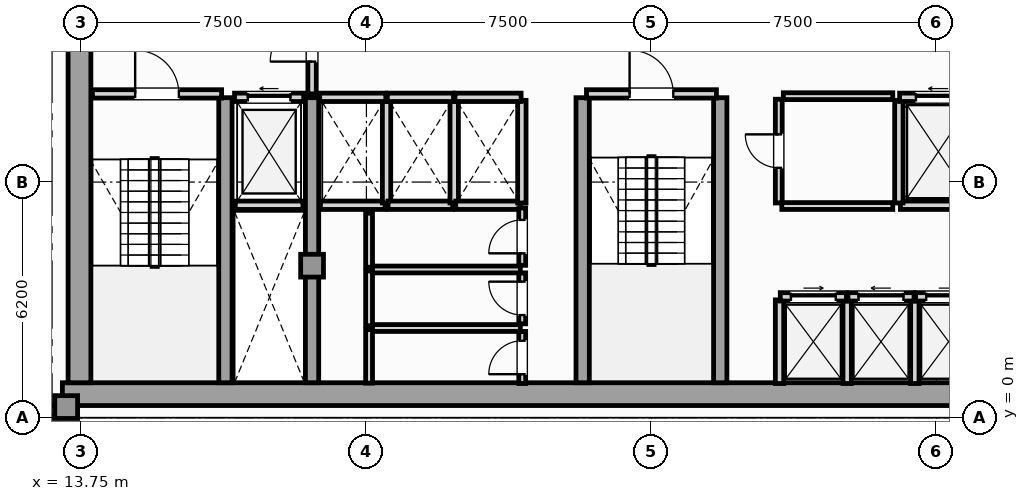
"""IFC4 building model, lengths in metres.
Left out: names, types, materials, properties, quantities, classifications, styles, units other than length and angle.
Written with IfcOpenShell. Run it as: python <this file> out.ifc"""

import sys

from ifc_helpers import new_model, si_unit, direction, frame, frame_2d, origin, origin_2d, place, context, subcontext, project, spatial, rectangle, extrude, element, fill, save


model = new_model("IFC4")
c1 = context("Model", 3, precision=1e-05, world=origin(), true_north=direction((0.0, 1.0)))
c2 = subcontext(c1, "Body", "Model", "MODEL_VIEW")
j1 = project(units=[si_unit("LENGTHUNIT", "METRE"), si_unit("PLANEANGLEUNIT", "RADIAN")], contexts=[c1])
p1 = place(None, origin())
s1 = spatial("IfcSite", under=j1, at=p1, CompositionType="ELEMENT")
p2 = place(p1, origin())
s2 = spatial("IfcBuilding", under=s1, at=p2, CompositionType="ELEMENT")
p3 = place(p2, frame((0.0, 0.0, 204.15)))
s3 = spatial("IfcBuildingStorey", under=s2, at=p3, CompositionType="ELEMENT", Elevation=204.15)
p4 = place(p3, frame((13.25, 0.62, 0.0), z_axis=(0.0, 0.0, 1.0), x_axis=(1.0, 0.0, 0.0)))
e1 = element("IfcWall", 1, at=p4, inside=s3, PredefinedType="SHEAR", context=c2, shape_type="SweptSolid", body=[
    extrude(rectangle(XDim=31.0, YDim=0.6, at=frame_2d((15.5, 0.0))), origin(), (0.0, 0.0, 1.0), 3.63),
])
p5 = place(p3, frame((13.7, 0.92, 0.0), z_axis=(0.0, 0.0, 1.0), x_axis=(0.0, 1.0, 0.0)))
e2 = element("IfcWall", 2, at=p5, inside=s3, PredefinedType="SHEAR", context=c2, shape_type="SweptSolid", body=[
    extrude(rectangle(XDim=10.53, YDim=0.6, at=frame_2d((5.265, 0.0))), origin(), (0.0, 0.0, 1.0), 3.63),
])
for number, where, z_axis, x_axis in (
    (3, (17.54, 0.92, 0.0), (0.0, 0.0, 1.0), (0.0, 1.0, 0.0)),
    (4, (19.82, 0.92, 0.0), (0.0, 0.0, 1.0), (0.0, 1.0, 0.0)),
    (5, (26.94, 0.92, 0.0), (0.0, 0.0, 1.0), (0.0, 1.0, 0.0)),
    (6, (30.56, 0.92, 0.0), (0.0, 0.0, 1.0), (0.0, 1.0, 0.0)),
):
    element("IfcWall", number, at=place(p3, frame(where, z_axis=z_axis, x_axis=x_axis)), inside=s3, PredefinedType="SHEAR", context=c2, shape_type="SweptSolid", body=[
        extrude(rectangle(XDim=7.5, YDim=0.35, at=frame_2d((3.75, 0.0))), origin(), (0.0, 0.0, 1.0), 3.63),
    ])
for number, where, z_axis, x_axis in (
    (7, (13.35, 0.28, 0.0), (0.0, 0.0, 1.0), (1.0, 0.0, 0.0)),
    (8, (19.82, 4.0, 0.0), (0.0, 0.0, 1.0), (1.0, 0.0, 0.0)),
):
    element("IfcColumn", number, at=place(p3, frame(where, z_axis=z_axis, x_axis=x_axis)), inside=s3, PredefinedType="COLUMN", context=c2, shape_type="SweptSolid", body=[
        extrude(rectangle(XDim=0.6, YDim=0.6, at=origin_2d()), origin(), (0.0, 0.0, 1.0), 3.85),
    ])
p6 = place(p3, frame((8.44, 0.18, 0.0), z_axis=(0.0, 0.0, 1.0), x_axis=(1.0, 0.0, 0.0)))
e9 = element("IfcWall", 9, at=p6, inside=s3, PredefinedType="SOLIDWALL", context=c2, shape_type="SweptSolid", body=[
    extrude(rectangle(XDim=4.81, YDim=0.3, at=frame_2d((2.405, 0.0))), origin(), (0.0, 0.0, 1.0), 3.63),
])
p7 = place(p6, frame((1.205, 0.0, 0.85)))
e10 = element("IfcOpeningElement", 10, at=p7, cuts=e9, PredefinedType="OPENING", context=c2, shape_type="SweptSolid", body=[
    extrude(rectangle(XDim=2.4, YDim=2.0, at=frame_2d((1.2, 1.0))), frame((0.0, 0.16, 0.0), z_axis=(0.0, -1.0, 0.0), x_axis=(1.0, 0.0, 0.0)), (0.0, 0.0, 1.0), 0.32),
])
p8 = place(p3, frame((17.8, 5.59, 0.0), z_axis=(0.0, 0.0, 1.0), x_axis=(1.0, 0.0, 0.0)))
e11 = element("IfcWall", 11, at=p8, inside=s3, PredefinedType="SOLIDWALL", context=c2, shape_type="SweptSolid", body=[
    extrude(rectangle(XDim=1.78, YDim=0.22, at=frame_2d((0.89, 0.0))), origin(), (0.0, 0.0, 1.0), 3.63),
])
p9 = place(p3, frame((17.78, 8.43, 0.0), z_axis=(0.0, 0.0, 1.0), x_axis=(1.0, 0.0, 0.0)))
e12 = element("IfcWall", 12, at=p9, inside=s3, PredefinedType="SOLIDWALL", context=c2, shape_type="SweptSolid", body=[
    extrude(rectangle(XDim=1.82, YDim=0.22, at=frame_2d((0.91, 0.0))), origin(), (0.0, 0.0, 1.0), 3.63),
])
p10 = place(p9, frame((0.35, 0.0, 0.0)))
e13 = element("IfcOpeningElement", 13, at=p10, cuts=e12, PredefinedType="OPENING", context=c2, shape_type="SweptSolid", body=[
    extrude(rectangle(XDim=1.12, YDim=2.25, at=frame_2d((0.56, 1.125))), frame((0.0, 0.12, 0.0), z_axis=(0.0, -1.0, 0.0), x_axis=(1.0, 0.0, 0.0)), (0.0, 0.0, 1.0), 0.24),
])
p11 = place(p3, frame((35.3, 5.59, 0.0), z_axis=(0.0, 0.0, 1.0), x_axis=(1.0, 0.0, 0.0)))
e14 = element("IfcWall", 14, at=p11, inside=s3, PredefinedType="SOLIDWALL", context=c2, shape_type="SweptSolid", body=[
    extrude(rectangle(XDim=2.0, YDim=0.22, at=frame_2d((1.0, 0.0))), origin(), (0.0, 0.0, 1.0), 3.63),
])
p12 = place(p3, frame((35.26, 5.65, 0.0), z_axis=(0.0, 0.0, 1.0), x_axis=(0.0, 1.0, 0.0)))
e15 = element("IfcWall", 15, at=p12, inside=s3, PredefinedType="SOLIDWALL", context=c2, shape_type="SweptSolid", body=[
    extrude(rectangle(XDim=2.7, YDim=0.22, at=frame_2d((1.35, 0.0))), origin(), (0.0, 0.0, 1.0), 3.63),
])
p13 = place(p3, frame((35.28, 8.43, 0.0), z_axis=(0.0, 0.0, 1.0), x_axis=(1.0, 0.0, 0.0)))
e16 = element("IfcWall", 16, at=p13, inside=s3, PredefinedType="SOLIDWALL", context=c2, shape_type="SweptSolid", body=[
    extrude(rectangle(XDim=2.04, YDim=0.22, at=frame_2d((1.02, 0.0))), origin(), (0.0, 0.0, 1.0), 3.63),
])
p14 = place(p13, frame((0.43, 0.0, 0.0)))
e17 = element("IfcOpeningElement", 17, at=p14, cuts=e16, PredefinedType="OPENING", context=c2, shape_type="SweptSolid", body=[
    extrude(rectangle(XDim=1.18, YDim=2.2, at=frame_2d((0.59, 1.1))), frame((0.0, 0.12, 0.0), z_axis=(0.0, -1.0, 0.0), x_axis=(1.0, 0.0, 0.0)), (0.0, 0.0, 1.0), 0.24),
])
for number, where, z_axis, x_axis in (
    (18, (32.12, 0.9, 0.0), (0.0, 0.0, 1.0), (0.0, 1.0, 0.0)),
    (19, (33.9, 0.9, 0.0), (0.0, 0.0, 1.0), (0.0, 1.0, 0.0)),
):
    element("IfcWall", number, at=place(p3, frame(where, z_axis=z_axis, x_axis=x_axis)), inside=s3, PredefinedType="SOLIDWALL", context=c2, shape_type="SweptSolid", body=[
        extrude(rectangle(XDim=2.2, YDim=0.22, at=frame_2d((1.1, 0.0))), origin(), (0.0, 0.0, 1.0), 3.63),
    ])
p15 = place(p3, frame((32.14, 3.18, 0.0), z_axis=(0.0, 0.0, 1.0), x_axis=(1.0, 0.0, 0.0)))
e20 = element("IfcWall", 20, at=p15, inside=s3, PredefinedType="SOLIDWALL", context=c2, shape_type="SweptSolid", body=[
    extrude(rectangle(XDim=1.74, YDim=0.22, at=frame_2d((0.87, 0.0))), origin(), (0.0, 0.0, 1.0), 3.63),
])
p16 = place(p15, frame((0.28, 0.0, 0.0)))
e21 = element("IfcOpeningElement", 21, at=p16, cuts=e20, PredefinedType="OPENING", context=c2, shape_type="SweptSolid", body=[
    extrude(rectangle(XDim=1.18, YDim=2.2, at=frame_2d((0.59, 1.1))), frame((0.0, 0.12, 0.0), z_axis=(0.0, -1.0, 0.0), x_axis=(1.0, 0.0, 0.0)), (0.0, 0.0, 1.0), 0.24),
])
p17 = place(p3, frame((35.68, 0.9, 0.0), z_axis=(0.0, 0.0, 1.0), x_axis=(0.0, 1.0, 0.0)))
e22 = element("IfcWall", 22, at=p17, inside=s3, PredefinedType="SOLIDWALL", context=c2, shape_type="SweptSolid", body=[
    extrude(rectangle(XDim=2.2, YDim=0.22, at=frame_2d((1.1, 0.0))), origin(), (0.0, 0.0, 1.0), 3.63),
])
p18 = place(p3, frame((33.92, 3.18, 0.0), z_axis=(0.0, 0.0, 1.0), x_axis=(1.0, 0.0, 0.0)))
e23 = element("IfcWall", 23, at=p18, inside=s3, PredefinedType="SOLIDWALL", context=c2, shape_type="SweptSolid", body=[
    extrude(rectangle(XDim=1.74, YDim=0.22, at=frame_2d((0.87, 0.0))), origin(), (0.0, 0.0, 1.0), 3.63),
])
p19 = place(p18, frame((0.28, 0.0, 0.0)))
e24 = element("IfcOpeningElement", 24, at=p19, cuts=e23, PredefinedType="OPENING", context=c2, shape_type="SweptSolid", body=[
    extrude(rectangle(XDim=1.18, YDim=2.2, at=frame_2d((0.59, 1.1))), frame((0.0, 0.12, 0.0), z_axis=(0.0, -1.0, 0.0), x_axis=(1.0, 0.0, 0.0)), (0.0, 0.0, 1.0), 0.24),
])
p20 = place(p3, frame((35.7, 3.18, 0.0), z_axis=(0.0, 0.0, 1.0), x_axis=(1.0, 0.0, 0.0)))
e25 = element("IfcWall", 25, at=p20, inside=s3, PredefinedType="SOLIDWALL", context=c2, shape_type="SweptSolid", body=[
    extrude(rectangle(XDim=1.74, YDim=0.22, at=frame_2d((0.87, 0.0))), origin(), (0.0, 0.0, 1.0), 3.63),
])
p21 = place(p20, frame((0.28, 0.0, 0.0)))
e26 = element("IfcOpeningElement", 26, at=p21, cuts=e25, PredefinedType="OPENING", context=c2, shape_type="SweptSolid", body=[
    extrude(rectangle(XDim=1.18, YDim=2.2, at=frame_2d((0.59, 1.1))), frame((0.0, 0.12, 0.0), z_axis=(0.0, -1.0, 0.0), x_axis=(1.0, 0.0, 0.0)), (0.0, 0.0, 1.0), 0.24),
])
p22 = place(p3, frame((20.04, 5.59, 0.0), z_axis=(0.0, 0.0, 1.0), x_axis=(1.0, 0.0, 0.0)))
e27 = element("IfcWall", 27, at=p22, inside=s3, PredefinedType="SOLIDWALL", context=c2, shape_type="SweptSolid", body=[
    extrude(rectangle(XDim=1.7, YDim=0.22, at=frame_2d((0.85, 0.0))), origin(), (0.0, 0.0, 1.0), 3.63),
])
p23 = place(p3, frame((21.78, 5.65, 0.0), z_axis=(0.0, 0.0, 1.0), x_axis=(0.0, 1.0, 0.0)))
e28 = element("IfcWall", 28, at=p23, inside=s3, PredefinedType="SOLIDWALL", context=c2, shape_type="SweptSolid", body=[
    extrude(rectangle(XDim=2.7, YDim=0.22, at=frame_2d((1.35, 0.0))), origin(), (0.0, 0.0, 1.0), 3.63),
])
p24 = place(p3, frame((20.02, 8.43, 0.0), z_axis=(0.0, 0.0, 1.0), x_axis=(1.0, 0.0, 0.0)))
e29 = element("IfcWall", 29, at=p24, inside=s3, PredefinedType="SOLIDWALL", context=c2, shape_type="SweptSolid", body=[
    extrude(rectangle(XDim=1.74, YDim=0.22, at=frame_2d((0.87, 0.0))), origin(), (0.0, 0.0, 1.0), 3.63),
])
p25 = place(p3, frame((21.82, 5.59, 0.0), z_axis=(0.0, 0.0, 1.0), x_axis=(1.0, 0.0, 0.0)))
e30 = element("IfcWall", 30, at=p25, inside=s3, PredefinedType="SOLIDWALL", context=c2, shape_type="SweptSolid", body=[
    extrude(rectangle(XDim=1.7, YDim=0.22, at=frame_2d((0.85, 0.0))), origin(), (0.0, 0.0, 1.0), 3.63),
])
p26 = place(p3, frame((23.56, 5.65, 0.0), z_axis=(0.0, 0.0, 1.0), x_axis=(0.0, 1.0, 0.0)))
e31 = element("IfcWall", 31, at=p26, inside=s3, PredefinedType="SOLIDWALL", context=c2, shape_type="SweptSolid", body=[
    extrude(rectangle(XDim=2.7, YDim=0.22, at=frame_2d((1.35, 0.0))), origin(), (0.0, 0.0, 1.0), 3.63),
])
p27 = place(p3, frame((21.8, 8.43, 0.0), z_axis=(0.0, 0.0, 1.0), x_axis=(1.0, 0.0, 0.0)))
e32 = element("IfcWall", 32, at=p27, inside=s3, PredefinedType="SOLIDWALL", context=c2, shape_type="SweptSolid", body=[
    extrude(rectangle(XDim=1.74, YDim=0.22, at=frame_2d((0.87, 0.0))), origin(), (0.0, 0.0, 1.0), 3.63),
])
p28 = place(p3, frame((23.6, 5.59, 0.0), z_axis=(0.0, 0.0, 1.0), x_axis=(1.0, 0.0, 0.0)))
e33 = element("IfcWall", 33, at=p28, inside=s3, PredefinedType="SOLIDWALL", context=c2, shape_type="SweptSolid", body=[
    extrude(rectangle(XDim=1.7, YDim=0.22, at=frame_2d((0.85, 0.0))), origin(), (0.0, 0.0, 1.0), 3.63),
])
p29 = place(p3, frame((25.34, 5.65, 0.0), z_axis=(0.0, 0.0, 1.0), x_axis=(0.0, 1.0, 0.0)))
e34 = element("IfcWall", 34, at=p29, inside=s3, PredefinedType="SOLIDWALL", context=c2, shape_type="SweptSolid", body=[
    extrude(rectangle(XDim=2.7, YDim=0.22, at=frame_2d((1.35, 0.0))), origin(), (0.0, 0.0, 1.0), 3.63),
])
p30 = place(p3, frame((23.58, 8.43, 0.0), z_axis=(0.0, 0.0, 1.0), x_axis=(1.0, 0.0, 0.0)))
e35 = element("IfcWall", 35, at=p30, inside=s3, PredefinedType="SOLIDWALL", context=c2, shape_type="SweptSolid", body=[
    extrude(rectangle(XDim=1.74, YDim=0.22, at=frame_2d((0.87, 0.0))), origin(), (0.0, 0.0, 1.0), 3.63),
])
p31 = place(p3, frame((14.04, 8.52, 0.0), z_axis=(0.0, 0.0, 1.0), x_axis=(1.0, 0.0, 0.0)))
e36 = element("IfcWall", 36, at=p31, inside=s3, PredefinedType="SOLIDWALL", context=c2, shape_type="SweptSolid", body=[
    extrude(rectangle(XDim=3.4, YDim=0.22, at=frame_2d((1.7, 0.0))), origin(), (0.0, 0.0, 1.0), 3.63),
])
p32 = place(p31, frame((1.125, 0.0, 0.0)))
e37 = element("IfcOpeningElement", 37, at=p32, cuts=e36, PredefinedType="OPENING", context=c2, shape_type="SweptSolid", body=[
    extrude(rectangle(XDim=1.15, YDim=2.2, at=frame_2d((0.575, 1.1))), frame((0.0, 0.12, 0.0), z_axis=(0.0, -1.0, 0.0), x_axis=(1.0, 0.0, 0.0)), (0.0, 0.0, 1.0), 0.24),
])
p33 = place(p3, frame((27.04, 8.52, 0.0), z_axis=(0.0, 0.0, 1.0), x_axis=(1.0, 0.0, 0.0)))
e38 = element("IfcWall", 38, at=p33, inside=s3, PredefinedType="SOLIDWALL", context=c2, shape_type="SweptSolid", body=[
    extrude(rectangle(XDim=3.42, YDim=0.22, at=frame_2d((1.71, 0.0))), origin(), (0.0, 0.0, 1.0), 3.63),
])
p34 = place(p33, frame((1.135, 0.0, 0.0)))
e39 = element("IfcOpeningElement", 39, at=p34, cuts=e38, PredefinedType="OPENING", context=c2, shape_type="SweptSolid", body=[
    extrude(rectangle(XDim=1.15, YDim=2.2, at=frame_2d((0.575, 1.1))), frame((0.0, 0.12, 0.0), z_axis=(0.0, -1.0, 0.0), x_axis=(1.0, 0.0, 0.0)), (0.0, 0.0, 1.0), 0.24),
])
p35 = place(p3, frame((19.82, 8.52, 0.0), z_axis=(0.0, 0.0, 1.0), x_axis=(0.0, 1.0, 0.0)))
e40 = element("IfcWall", 40, at=p35, inside=s3, PredefinedType="SOLIDWALL", context=c2, shape_type="SweptSolid", body=[
    extrude(rectangle(XDim=2.8, YDim=0.22, at=frame_2d((1.4, 0.0))), origin(), (0.0, 0.0, 1.0), 3.086),
])
p36 = place(p35, frame((0.85, 0.0, 0.0)))
e41 = element("IfcOpeningElement", 41, at=p36, cuts=e40, PredefinedType="OPENING", context=c2, shape_type="SweptSolid", body=[
    extrude(rectangle(XDim=1.1, YDim=2.2, at=frame_2d((0.55, 1.1))), frame((0.0, 0.12, 0.0), z_axis=(0.0, -1.0, 0.0), x_axis=(1.0, 0.0, 0.0)), (0.0, 0.0, 1.0), 0.24),
])
p37 = place(p3, frame((25.35, 0.9, 0.0), z_axis=(0.0, 0.0, 1.0), x_axis=(0.0, 1.0, 0.0)))
e42 = element("IfcWall", 42, at=p37, inside=s3, PredefinedType="PARTITIONING", context=c2, shape_type="SweptSolid", body=[
    extrude(rectangle(XDim=1.37, YDim=0.18, at=frame_2d((0.685, 0.0))), origin(), (0.0, 0.0, 1.0), 3.63),
])
p38 = place(p37, frame((0.245, 0.0, 0.0)))
e43 = element("IfcOpeningElement", 43, at=p38, cuts=e42, PredefinedType="OPENING", context=c2, shape_type="SweptSolid", body=[
    extrude(rectangle(XDim=0.88, YDim=2.05, at=frame_2d((0.44, 1.025))), frame((0.0, 0.1, 0.0), z_axis=(0.0, -1.0, 0.0), x_axis=(1.0, 0.0, 0.0)), (0.0, 0.0, 1.0), 0.2),
])
p39 = place(p3, frame((21.36, 2.36, 0.0), z_axis=(0.0, 0.0, 1.0), x_axis=(1.0, 0.0, 0.0)))
e44 = element("IfcWall", 44, at=p39, inside=s3, PredefinedType="PARTITIONING", context=c2, shape_type="SweptSolid", body=[
    extrude(rectangle(XDim=3.94, YDim=0.18, at=frame_2d((1.97, 0.0))), origin(), (0.0, 0.0, 1.0), 3.63),
])
p40 = place(p3, frame((21.32, 0.91, 0.0), z_axis=(0.0, 0.0, 1.0), x_axis=(0.0, 1.0, 0.0)))
e45 = element("IfcWall", 45, at=p40, inside=s3, PredefinedType="PARTITIONING", context=c2, shape_type="SweptSolid", body=[
    extrude(rectangle(XDim=1.41, YDim=0.18, at=frame_2d((0.705, 0.0))), origin(), (0.0, 0.0, 1.0), 3.63),
])
p41 = place(p3, frame((25.35, 2.47, 0.0), z_axis=(0.0, 0.0, 1.0), x_axis=(0.0, 1.0, 0.0)))
e46 = element("IfcWall", 46, at=p41, inside=s3, PredefinedType="PARTITIONING", context=c2, shape_type="SweptSolid", body=[
    extrude(rectangle(XDim=1.34, YDim=0.18, at=frame_2d((0.67, 0.0))), origin(), (0.0, 0.0, 1.0), 3.63),
])
p42 = place(p41, frame((0.23, 0.0, 0.0)))
e47 = element("IfcOpeningElement", 47, at=p42, cuts=e46, PredefinedType="OPENING", context=c2, shape_type="SweptSolid", body=[
    extrude(rectangle(XDim=0.88, YDim=2.05, at=frame_2d((0.44, 1.025))), frame((0.0, 0.1, 0.0), z_axis=(0.0, -1.0, 0.0), x_axis=(1.0, 0.0, 0.0)), (0.0, 0.0, 1.0), 0.2),
])
p43 = place(p3, frame((21.36, 3.9, 0.0), z_axis=(0.0, 0.0, 1.0), x_axis=(1.0, 0.0, 0.0)))
e48 = element("IfcWall", 48, at=p43, inside=s3, PredefinedType="PARTITIONING", context=c2, shape_type="SweptSolid", body=[
    extrude(rectangle(XDim=3.94, YDim=0.18, at=frame_2d((1.97, 0.0))), origin(), (0.0, 0.0, 1.0), 3.63),
])
p44 = place(p3, frame((21.32, 2.42, 0.0), z_axis=(0.0, 0.0, 1.0), x_axis=(0.0, 1.0, 0.0)))
e49 = element("IfcWall", 49, at=p44, inside=s3, PredefinedType="PARTITIONING", context=c2, shape_type="SweptSolid", body=[
    extrude(rectangle(XDim=1.44, YDim=0.18, at=frame_2d((0.72, 0.0))), origin(), (0.0, 0.0, 1.0), 3.63),
])
p45 = place(p3, frame((25.35, 4.01, 0.0), z_axis=(0.0, 0.0, 1.0), x_axis=(0.0, 1.0, 0.0)))
e50 = element("IfcWall", 50, at=p45, inside=s3, PredefinedType="PARTITIONING", context=c2, shape_type="SweptSolid", body=[
    extrude(rectangle(XDim=1.51, YDim=0.18, at=frame_2d((0.755, 0.0))), origin(), (0.0, 0.0, 1.0), 3.63),
])
p46 = place(p45, frame((0.315, 0.0, 0.0)))
e51 = element("IfcOpeningElement", 51, at=p46, cuts=e50, PredefinedType="OPENING", context=c2, shape_type="SweptSolid", body=[
    extrude(rectangle(XDim=0.88, YDim=2.05, at=frame_2d((0.44, 1.025))), frame((0.0, 0.1, 0.0), z_axis=(0.0, -1.0, 0.0), x_axis=(1.0, 0.0, 0.0)), (0.0, 0.0, 1.0), 0.2),
])
p47 = place(p3, frame((21.32, 3.96, 0.0), z_axis=(0.0, 0.0, 1.0), x_axis=(0.0, 1.0, 0.0)))
e52 = element("IfcWall", 52, at=p47, inside=s3, PredefinedType="PARTITIONING", context=c2, shape_type="SweptSolid", body=[
    extrude(rectangle(XDim=1.42, YDim=0.18, at=frame_2d((0.71, 0.0))), origin(), (0.0, 0.0, 1.0), 3.63),
])
p48 = place(p3, frame((32.1, 5.65, 0.0), z_axis=(0.0, 0.0, 1.0), x_axis=(0.0, 1.0, 0.0)))
e53 = element("IfcWall", 53, at=p48, inside=s3, PredefinedType="PARTITIONING", context=c2, shape_type="SweptSolid", body=[
    extrude(rectangle(XDim=2.73, YDim=0.18, at=frame_2d((1.365, 0.0))), origin(), (0.0, 0.0, 1.0), 3.63),
])
p49 = place(p48, frame((0.925, 0.0, 0.0)))
e54 = element("IfcOpeningElement", 54, at=p49, cuts=e53, PredefinedType="OPENING", context=c2, shape_type="SweptSolid", body=[
    extrude(rectangle(XDim=0.88, YDim=2.05, at=frame_2d((0.44, 1.025))), frame((0.0, 0.1, 0.0), z_axis=(0.0, -1.0, 0.0), x_axis=(1.0, 0.0, 0.0)), (0.0, 0.0, 1.0), 0.2),
])
p50 = place(p3, frame((32.22, 8.46, 0.0), z_axis=(0.0, 0.0, 1.0), x_axis=(1.0, 0.0, 0.0)))
e55 = element("IfcWall", 55, at=p50, inside=s3, PredefinedType="PARTITIONING", context=c2, shape_type="SweptSolid", body=[
    extrude(rectangle(XDim=2.88, YDim=0.18, at=frame_2d((1.44, 0.0))), origin(), (0.0, 0.0, 1.0), 3.63),
])
p51 = place(p3, frame((32.18, 5.57, 0.0), z_axis=(0.0, 0.0, 1.0), x_axis=(1.0, 0.0, 0.0)))
e56 = element("IfcWall", 56, at=p51, inside=s3, PredefinedType="PARTITIONING", context=c2, shape_type="SweptSolid", body=[
    extrude(rectangle(XDim=2.92, YDim=0.18, at=frame_2d((1.46, 0.0))), origin(), (0.0, 0.0, 1.0), 3.63),
])
p52 = place(p10, origin())
e57 = element("IfcDoor", 57, at=p52, inside=s3, OperationType="SLIDING_TO_LEFT", PredefinedType="DOOR", context=c2, shape_type="SweptSolid", body=[
    extrude(rectangle(XDim=1.12, YDim=2.25, at=frame_2d((0.56, 1.125))), frame((0.0, 0.025, 0.0), z_axis=(0.0, -1.0, 0.0), x_axis=(1.0, 0.0, 0.0)), (0.0, 0.0, 1.0), 0.05),
])
fill(e13, e57)
p53 = place(p14, origin())
e58 = element("IfcDoor", 58, at=p53, inside=s3, OperationType="SLIDING_TO_LEFT", PredefinedType="DOOR", context=c2, shape_type="SweptSolid", body=[
    extrude(rectangle(XDim=1.18, YDim=2.2, at=frame_2d((0.59, 1.1))), frame((0.0, 0.025, 0.0), z_axis=(0.0, -1.0, 0.0), x_axis=(1.0, 0.0, 0.0)), (0.0, 0.0, 1.0), 0.05),
])
fill(e17, e58)
p54 = place(p16, origin())
e59 = element("IfcDoor", 59, at=p54, inside=s3, OperationType="SLIDING_TO_RIGHT", PredefinedType="DOOR", context=c2, shape_type="SweptSolid", body=[
    extrude(rectangle(XDim=1.18, YDim=2.2, at=frame_2d((0.59, 1.1))), frame((0.0, 0.025, 0.0), z_axis=(0.0, -1.0, 0.0), x_axis=(1.0, 0.0, 0.0)), (0.0, 0.0, 1.0), 0.05),
])
fill(e21, e59)
p55 = place(p19, origin())
e60 = element("IfcDoor", 60, at=p55, inside=s3, OperationType="SLIDING_TO_LEFT", PredefinedType="DOOR", context=c2, shape_type="SweptSolid", body=[
    extrude(rectangle(XDim=1.18, YDim=2.2, at=frame_2d((0.59, 1.1))), frame((0.0, 0.025, 0.0), z_axis=(0.0, -1.0, 0.0), x_axis=(1.0, 0.0, 0.0)), (0.0, 0.0, 1.0), 0.05),
])
fill(e24, e60)
p56 = place(p21, origin())
e61 = element("IfcDoor", 61, at=p56, inside=s3, OperationType="SLIDING_TO_RIGHT", PredefinedType="DOOR", context=c2, shape_type="SweptSolid", body=[
    extrude(rectangle(XDim=1.18, YDim=2.2, at=frame_2d((0.59, 1.1))), frame((0.0, 0.025, 0.0), z_axis=(0.0, -1.0, 0.0), x_axis=(1.0, 0.0, 0.0)), (0.0, 0.0, 1.0), 0.05),
])
fill(e26, e61)
p57 = place(p32, origin())
e62 = element("IfcDoor", 62, at=p57, inside=s3, OperationType="SINGLE_SWING_LEFT", PredefinedType="DOOR", context=c2, shape_type="SweptSolid", body=[
    extrude(rectangle(XDim=1.15, YDim=2.2, at=frame_2d((0.575, 1.1))), frame((0.0, 0.025, 0.0), z_axis=(0.0, -1.0, 0.0), x_axis=(1.0, 0.0, 0.0)), (0.0, 0.0, 1.0), 0.05),
])
fill(e37, e62)
p58 = place(p34, origin())
e63 = element("IfcDoor", 63, at=p58, inside=s3, OperationType="SINGLE_SWING_LEFT", PredefinedType="DOOR", context=c2, shape_type="SweptSolid", body=[
    extrude(rectangle(XDim=1.15, YDim=2.2, at=frame_2d((0.575, 1.1))), frame((0.0, 0.025, 0.0), z_axis=(0.0, -1.0, 0.0), x_axis=(1.0, 0.0, 0.0)), (0.0, 0.0, 1.0), 0.05),
])
fill(e39, e63)
p59 = place(p36, origin())
e64 = element("IfcDoor", 64, at=p59, inside=s3, OperationType="SINGLE_SWING_LEFT", PredefinedType="DOOR", context=c2, shape_type="SweptSolid", body=[
    extrude(rectangle(XDim=1.1, YDim=2.2, at=frame_2d((0.55, 1.1))), frame((0.0, 0.025, 0.0), z_axis=(0.0, -1.0, 0.0), x_axis=(1.0, 0.0, 0.0)), (0.0, 0.0, 1.0), 0.05),
])
fill(e41, e64)
p60 = place(p38, origin())
e65 = element("IfcDoor", 65, at=p60, inside=s3, OperationType="SINGLE_SWING_LEFT", PredefinedType="DOOR", context=c2, shape_type="SweptSolid", body=[
    extrude(rectangle(XDim=0.88, YDim=2.05, at=frame_2d((0.44, 1.025))), frame((0.0, 0.025, 0.0), z_axis=(0.0, -1.0, 0.0), x_axis=(1.0, 0.0, 0.0)), (0.0, 0.0, 1.0), 0.05),
])
fill(e43, e65)
p61 = place(p42, origin())
e66 = element("IfcDoor", 66, at=p61, inside=s3, OperationType="SINGLE_SWING_RIGHT", PredefinedType="DOOR", context=c2, shape_type="SweptSolid", body=[
    extrude(rectangle(XDim=0.88, YDim=2.05, at=frame_2d((0.44, 1.025))), frame((0.0, 0.025, 0.0), z_axis=(0.0, -1.0, 0.0), x_axis=(1.0, 0.0, 0.0)), (0.0, 0.0, 1.0), 0.05),
])
fill(e47, e66)
p62 = place(p46, origin())
e67 = element("IfcDoor", 67, at=p62, inside=s3, OperationType="SINGLE_SWING_LEFT", PredefinedType="DOOR", context=c2, shape_type="SweptSolid", body=[
    extrude(rectangle(XDim=0.88, YDim=2.05, at=frame_2d((0.44, 1.025))), frame((0.0, 0.025, 0.0), z_axis=(0.0, -1.0, 0.0), x_axis=(1.0, 0.0, 0.0)), (0.0, 0.0, 1.0), 0.05),
])
fill(e51, e67)
p63 = place(p49, origin())
e68 = element("IfcDoor", 68, at=p63, inside=s3, OperationType="SINGLE_SWING_RIGHT", PredefinedType="DOOR", context=c2, shape_type="SweptSolid", body=[
    extrude(rectangle(XDim=0.88, YDim=2.05, at=frame_2d((0.44, 1.025))), frame((0.0, 0.025, 0.0), z_axis=(0.0, -1.0, 0.0), x_axis=(1.0, 0.0, 0.0)), (0.0, 0.0, 1.0), 0.05),
])
fill(e54, e68)
save(model, sys.argv[1])
